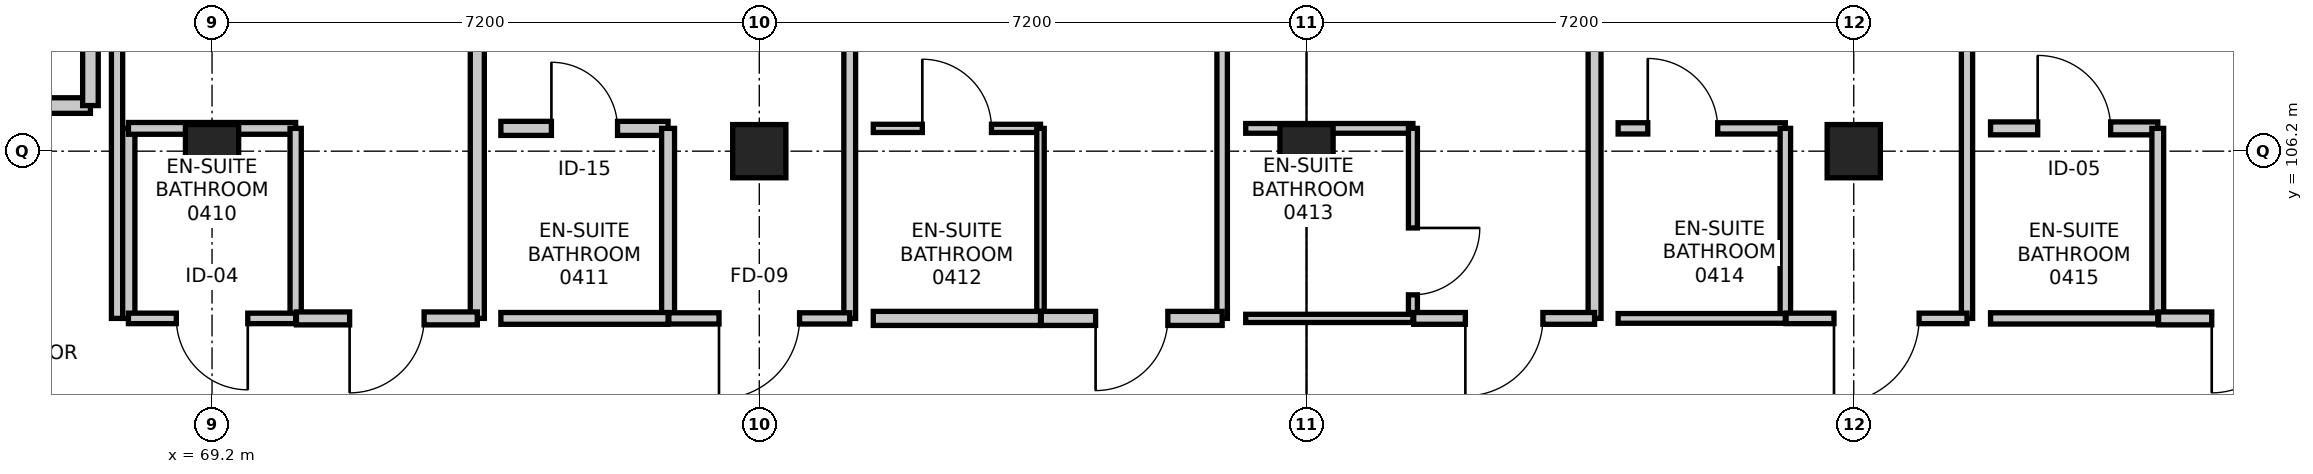
"""IFC4 building model, lengths in metres.
Left out: names, types, materials, properties, quantities, classifications, styles, units other than length and angle.
Written with IfcOpenShell. Run it as: python <this file> out.ifc"""

import sys

from ifc_helpers import new_model, si_unit, direction, frame, frame_2d, origin, origin_2d, place, context, subcontext, project, spatial, rectangle, extrude, element, fill, save


model = new_model("IFC4")
c1 = context("Model", 3, precision=1e-05, world=origin(), true_north=direction((0.0, 1.0)))
c2 = subcontext(c1, "Body", "Model", "MODEL_VIEW")
j1 = project(units=[si_unit("LENGTHUNIT", "METRE"), si_unit("PLANEANGLEUNIT", "RADIAN")], contexts=[c1])
p1 = place(None, origin())
s1 = spatial("IfcSite", under=j1, at=p1, CompositionType="ELEMENT")
p2 = place(p1, origin())
s2 = spatial("IfcBuilding", under=s1, at=p2, CompositionType="ELEMENT")
p3 = place(p2, frame((0.0, 0.0, 19.2)))
s3 = spatial("IfcBuildingStorey", under=s2, at=p3, CompositionType="ELEMENT", Elevation=19.2)
for number, where, z_axis, x_axis in (
    (1, (69.2, 106.2, 0.0), (0.0, 0.0, 1.0), (1.0, 0.0, 0.0)),
    (2, (76.4, 106.2, 0.0), (0.0, 0.0, 1.0), (1.0, 0.0, 0.0)),
    (3, (83.6, 106.2, 0.0), (0.0, 0.0, 1.0), (1.0, 0.0, 0.0)),
    (4, (90.8, 106.2, 0.0), (0.0, 0.0, 1.0), (1.0, 0.0, 0.0)),
):
    element("IfcColumn", number, at=place(p3, frame(where, z_axis=z_axis, x_axis=x_axis)), inside=s3, PredefinedType="COLUMN", context=c2, shape_type="SweptSolid", body=[
        extrude(rectangle(XDim=0.7, YDim=0.7, at=origin_2d()), origin(), (0.0, 0.0, 1.0), 3.6),
    ])
p4 = place(p3, frame((62.6, 106.8, 0.0), z_axis=(0.0, 0.0, 1.0), x_axis=(1.0, 0.0, 0.0)))
e5 = element("IfcWall", 5, at=p4, inside=s3, PredefinedType="PARTITIONING", context=c2, shape_type="SweptSolid", body=[
    extrude(rectangle(XDim=5.0, YDim=0.205, at=frame_2d((2.5, 0.0))), origin(), (0.0, 0.0, 1.0), 3.35),
])
p5 = place(p4, frame((1.9, 0.0, 0.0)))
e6 = element("IfcOpeningElement", 6, at=p5, cuts=e5, PredefinedType="OPENING", context=c2, shape_type="SweptSolid", body=[
    extrude(rectangle(XDim=1.2, YDim=2.1, at=frame_2d((0.6, 1.05))), frame((0.0, 0.113, 0.0), z_axis=(0.0, -1.0, 0.0), x_axis=(1.0, 0.0, 0.0)), (0.0, 0.0, 1.0), 0.225),
])
p6 = place(p3, frame((67.6, 106.8, 0.0), z_axis=(0.0, 0.0, 1.0), x_axis=(0.0, 1.0, 0.0)))
e7 = element("IfcWall", 7, at=p6, inside=s3, PredefinedType="PARTITIONING", context=c2, shape_type="SweptSolid", body=[
    extrude(rectangle(XDim=2.7, YDim=0.205, at=frame_2d((1.35, 0.0))), origin(), (0.0, 0.0, 1.0), 3.35),
])
p7 = place(p3, frame((68.1, 104.0, 0.0), z_axis=(0.0, 0.0, 1.0), x_axis=(0.0, 1.0, 0.0)))
e8 = element("IfcWall", 8, at=p7, inside=s3, PredefinedType="PARTITIONING", context=c2, shape_type="SweptSolid", body=[
    extrude(rectangle(XDim=2.5, YDim=0.17, at=frame_2d((1.25, 0.0))), origin(), (0.0, 0.0, 1.0), 2.735),
])
p8 = place(p3, frame((68.1, 106.5, 0.0), z_axis=(0.0, 0.0, 1.0), x_axis=(1.0, 0.0, 0.0)))
e9 = element("IfcWall", 9, at=p8, inside=s3, PredefinedType="PARTITIONING", context=c2, shape_type="SweptSolid", body=[
    extrude(rectangle(XDim=2.2, YDim=0.155, at=frame_2d((1.1, 0.0))), origin(), (0.0, 0.0, 1.0), 2.685),
])
p9 = place(p3, frame((70.3, 106.5, 0.0), z_axis=(0.0, 0.0, 1.0), x_axis=(0.0, -1.0, 0.0)))
e10 = element("IfcWall", 10, at=p9, inside=s3, PredefinedType="PARTITIONING", context=c2, shape_type="SweptSolid", body=[
    extrude(rectangle(XDim=2.5, YDim=0.148, at=frame_2d((1.25, 0.0))), origin(), (0.0, 0.0, 1.0), 2.735),
])
p10 = place(p3, frame((70.3, 104.0, 0.0), z_axis=(0.0, 0.0, 1.0), x_axis=(-1.0, 0.0, 0.0)))
e11 = element("IfcWall", 11, at=p10, inside=s3, PredefinedType="PARTITIONING", context=c2, shape_type="SweptSolid", body=[
    extrude(rectangle(XDim=2.2, YDim=0.138, at=frame_2d((1.1, 0.0))), origin(), (0.0, 0.0, 1.0), 2.685),
])
p11 = place(p10, frame((0.63, 0.0, 0.0)))
e12 = element("IfcOpeningElement", 12, at=p11, cuts=e11, PredefinedType="OPENING", context=c2, shape_type="SweptSolid", body=[
    extrude(rectangle(XDim=0.94, YDim=2.12, at=frame_2d((0.47, 1.06))), frame((0.0, 0.079, 0.0), z_axis=(0.0, -1.0, 0.0), x_axis=(1.0, 0.0, 0.0)), (0.0, 0.0, 1.0), 0.158),
])
p12 = place(p3, frame((67.95, 104.0, 0.0), z_axis=(0.0, 0.0, 1.0), x_axis=(0.0, 1.0, 0.0)))
e13 = element("IfcWall", 13, at=p12, inside=s3, PredefinedType="PARTITIONING", context=c2, shape_type="SweptSolid", body=[
    extrude(rectangle(XDim=11.042, YDim=0.148, at=frame_2d((5.521, 0.0))), origin(), (0.0, 0.0, 1.0), 2.735),
])
p13 = place(p3, frame((72.69, 115.339, 0.0), z_axis=(0.0, 0.0, 1.0), x_axis=(0.0, -1.0, 0.0)))
e14 = element("IfcWall", 14, at=p13, inside=s3, PredefinedType="PARTITIONING", context=c2, shape_type="SweptSolid", body=[
    extrude(rectangle(XDim=11.339, YDim=0.185, at=frame_2d((5.669, 0.0))), origin(), (0.0, 0.0, 1.0), 2.735),
])
p14 = place(p3, frame((72.69, 104.0, 0.0), z_axis=(0.0, 0.0, 1.0), x_axis=(-1.0, 0.0, 0.0)))
e15 = element("IfcWall", 15, at=p14, inside=s3, PredefinedType="PARTITIONING", context=c2, shape_type="SweptSolid", body=[
    extrude(rectangle(XDim=2.38, YDim=0.17, at=frame_2d((1.19, 0.0))), origin(), (0.0, 0.0, 1.0), 3.35),
])
p15 = place(p14, frame((0.7, 0.0, 0.0)))
e16 = element("IfcOpeningElement", 16, at=p15, cuts=e15, PredefinedType="OPENING", context=c2, shape_type="SweptSolid", body=[
    extrude(rectangle(XDim=0.98, YDim=2.15, at=frame_2d((0.49, 1.075))), frame((0.0, 0.095, 0.0), z_axis=(0.0, -1.0, 0.0), x_axis=(1.0, 0.0, 0.0)), (0.0, 0.0, 1.0), 0.19),
])
p16 = place(p3, frame((73.0, 106.5, 0.0), z_axis=(0.0, 0.0, 1.0), x_axis=(1.0, 0.0, 0.0)))
e17 = element("IfcWall", 17, at=p16, inside=s3, PredefinedType="PARTITIONING", context=c2, shape_type="SweptSolid", body=[
    extrude(rectangle(XDim=2.2, YDim=0.185, at=frame_2d((1.1, 0.0))), origin(), (0.0, 0.0, 1.0), 2.735),
])
p17 = place(p16, frame((0.665, 0.0, 0.0)))
e18 = element("IfcOpeningElement", 18, at=p17, cuts=e17, PredefinedType="OPENING", context=c2, shape_type="SweptSolid", body=[
    extrude(rectangle(XDim=0.87, YDim=2.07, at=frame_2d((0.435, 1.035))), frame((0.0, 0.103, 0.0), z_axis=(0.0, -1.0, 0.0), x_axis=(1.0, 0.0, 0.0)), (0.0, 0.0, 1.0), 0.205),
])
p18 = place(p3, frame((75.2, 106.5, 0.0), z_axis=(0.0, 0.0, 1.0), x_axis=(0.0, -1.0, 0.0)))
e19 = element("IfcWall", 19, at=p18, inside=s3, PredefinedType="PARTITIONING", context=c2, shape_type="SweptSolid", body=[
    extrude(rectangle(XDim=2.5, YDim=0.17, at=frame_2d((1.25, 0.0))), origin(), (0.0, 0.0, 1.0), 2.735),
])
p19 = place(p3, frame((75.2, 104.0, 0.0), z_axis=(0.0, 0.0, 1.0), x_axis=(-1.0, 0.0, 0.0)))
e20 = element("IfcWall", 20, at=p19, inside=s3, PredefinedType="PARTITIONING", context=c2, shape_type="SweptSolid", body=[
    extrude(rectangle(XDim=2.2, YDim=0.155, at=frame_2d((1.1, 0.0))), origin(), (0.0, 0.0, 1.0), 3.35),
])
p20 = place(p3, frame((77.59, 115.607, 0.0), z_axis=(0.0, 0.0, 1.0), x_axis=(0.0, -1.0, 0.0)))
e21 = element("IfcWall", 21, at=p20, inside=s3, PredefinedType="PARTITIONING", context=c2, shape_type="SweptSolid", body=[
    extrude(rectangle(XDim=11.607, YDim=0.155, at=frame_2d((5.804, 0.0))), origin(), (0.0, 0.0, 1.0), 2.735),
])
p21 = place(p3, frame((77.59, 104.0, 0.0), z_axis=(0.0, 0.0, 1.0), x_axis=(-1.0, 0.0, 0.0)))
e22 = element("IfcWall", 22, at=p21, inside=s3, PredefinedType="PARTITIONING", context=c2, shape_type="SweptSolid", body=[
    extrude(rectangle(XDim=2.38, YDim=0.148, at=frame_2d((1.19, 0.0))), origin(), (0.0, 0.0, 1.0), 2.685),
])
p22 = place(p21, frame((0.66, 0.0, 0.0)))
e23 = element("IfcOpeningElement", 23, at=p22, cuts=e22, PredefinedType="OPENING", context=c2, shape_type="SweptSolid", body=[
    extrude(rectangle(XDim=1.06, YDim=2.2, at=frame_2d((0.53, 1.1))), frame((0.0, 0.084, 0.0), z_axis=(0.0, -1.0, 0.0), x_axis=(1.0, 0.0, 0.0)), (0.0, 0.0, 1.0), 0.168),
])
p23 = place(p3, frame((77.9, 106.5, 0.0), z_axis=(0.0, 0.0, 1.0), x_axis=(1.0, 0.0, 0.0)))
e24 = element("IfcWall", 24, at=p23, inside=s3, PredefinedType="PARTITIONING", context=c2, shape_type="SweptSolid", body=[
    extrude(rectangle(XDim=2.2, YDim=0.108, at=frame_2d((1.1, 0.0))), origin(), (0.0, 0.0, 1.0), 3.35),
])
p24 = place(p23, frame((0.645, 0.0, 0.0)))
e25 = element("IfcOpeningElement", 25, at=p24, cuts=e24, PredefinedType="OPENING", context=c2, shape_type="SweptSolid", body=[
    extrude(rectangle(XDim=0.91, YDim=2.11, at=frame_2d((0.455, 1.055))), frame((0.0, 0.064, 0.0), z_axis=(0.0, -1.0, 0.0), x_axis=(1.0, 0.0, 0.0)), (0.0, 0.0, 1.0), 0.128),
])
p25 = place(p3, frame((80.1, 106.5, 0.0), z_axis=(0.0, 0.0, 1.0), x_axis=(0.0, -1.0, 0.0)))
e26 = element("IfcWall", 26, at=p25, inside=s3, PredefinedType="PARTITIONING", context=c2, shape_type="SweptSolid", body=[
    extrude(rectangle(XDim=2.5, YDim=0.098, at=frame_2d((1.25, 0.0))), origin(), (0.0, 0.0, 1.0), 2.735),
])
p26 = place(p3, frame((80.1, 104.0, 0.0), z_axis=(0.0, 0.0, 1.0), x_axis=(-1.0, 0.0, 0.0)))
e27 = element("IfcWall", 27, at=p26, inside=s3, PredefinedType="PARTITIONING", context=c2, shape_type="SweptSolid", body=[
    extrude(rectangle(XDim=2.2, YDim=0.185, at=frame_2d((1.1, 0.0))), origin(), (0.0, 0.0, 1.0), 3.35),
])
p27 = place(p3, frame((82.49, 115.829, 0.0), z_axis=(0.0, 0.0, 1.0), x_axis=(0.0, -1.0, 0.0)))
e28 = element("IfcWall", 28, at=p27, inside=s3, PredefinedType="PARTITIONING", context=c2, shape_type="SweptSolid", body=[
    extrude(rectangle(XDim=11.829, YDim=0.138, at=frame_2d((5.915, 0.0))), origin(), (0.0, 0.0, 1.0), 2.735),
])
p28 = place(p3, frame((82.49, 104.0, 0.0), z_axis=(0.0, 0.0, 1.0), x_axis=(-1.0, 0.0, 0.0)))
e29 = element("IfcWall", 29, at=p28, inside=s3, PredefinedType="PARTITIONING", context=c2, shape_type="SweptSolid", body=[
    extrude(rectangle(XDim=2.38, YDim=0.185, at=frame_2d((1.19, 0.0))), origin(), (0.0, 0.0, 1.0), 3.35),
])
p29 = place(p28, frame((0.715, 0.0, 0.0)))
e30 = element("IfcOpeningElement", 30, at=p29, cuts=e29, PredefinedType="OPENING", context=c2, shape_type="SweptSolid", body=[
    extrude(rectangle(XDim=0.95, YDim=2.1, at=frame_2d((0.475, 1.05))), frame((0.0, 0.103, 0.0), z_axis=(0.0, -1.0, 0.0), x_axis=(1.0, 0.0, 0.0)), (0.0, 0.0, 1.0), 0.205),
])
p30 = place(p3, frame((82.8, 106.5, 0.0), z_axis=(0.0, 0.0, 1.0), x_axis=(1.0, 0.0, 0.0)))
e31 = element("IfcWall", 31, at=p30, inside=s3, PredefinedType="PARTITIONING", context=c2, shape_type="SweptSolid", body=[
    extrude(rectangle(XDim=2.2, YDim=0.128, at=frame_2d((1.1, 0.0))), origin(), (0.0, 0.0, 1.0), 2.685),
])
p31 = place(p3, frame((85.0, 106.5, 0.0), z_axis=(0.0, 0.0, 1.0), x_axis=(0.0, -1.0, 0.0)))
e32 = element("IfcWall", 32, at=p31, inside=s3, PredefinedType="PARTITIONING", context=c2, shape_type="SweptSolid", body=[
    extrude(rectangle(XDim=2.5, YDim=0.118, at=frame_2d((1.25, 0.0))), origin(), (0.0, 0.0, 1.0), 2.735),
])
p32 = place(p31, frame((1.31, 0.0, 0.0)))
e33 = element("IfcOpeningElement", 33, at=p32, cuts=e32, PredefinedType="OPENING", context=c2, shape_type="SweptSolid", body=[
    extrude(rectangle(XDim=0.88, YDim=2.06, at=frame_2d((0.44, 1.03))), frame((0.0, 0.069, 0.0), z_axis=(0.0, -1.0, 0.0), x_axis=(1.0, 0.0, 0.0)), (0.0, 0.0, 1.0), 0.138),
])
p33 = place(p3, frame((85.0, 104.0, 0.0), z_axis=(0.0, 0.0, 1.0), x_axis=(-1.0, 0.0, 0.0)))
e34 = element("IfcWall", 34, at=p33, inside=s3, PredefinedType="PARTITIONING", context=c2, shape_type="SweptSolid", body=[
    extrude(rectangle(XDim=2.2, YDim=0.108, at=frame_2d((1.1, 0.0))), origin(), (0.0, 0.0, 1.0), 2.685),
])
p34 = place(p3, frame((87.39, 115.997, 0.0), z_axis=(0.0, 0.0, 1.0), x_axis=(0.0, -1.0, 0.0)))
e35 = element("IfcWall", 35, at=p34, inside=s3, PredefinedType="PARTITIONING", context=c2, shape_type="SweptSolid", body=[
    extrude(rectangle(XDim=11.997, YDim=0.17, at=frame_2d((5.999, 0.0))), origin(), (0.0, 0.0, 1.0), 2.735),
])
p35 = place(p3, frame((87.39, 104.0, 0.0), z_axis=(0.0, 0.0, 1.0), x_axis=(-1.0, 0.0, 0.0)))
e36 = element("IfcWall", 36, at=p35, inside=s3, PredefinedType="PARTITIONING", context=c2, shape_type="SweptSolid", body=[
    extrude(rectangle(XDim=2.38, YDim=0.155, at=frame_2d((1.19, 0.0))), origin(), (0.0, 0.0, 1.0), 3.35),
])
p36 = place(p35, frame((0.68, 0.0, 0.0)))
e37 = element("IfcOpeningElement", 37, at=p36, cuts=e36, PredefinedType="OPENING", context=c2, shape_type="SweptSolid", body=[
    extrude(rectangle(XDim=1.02, YDim=2.15, at=frame_2d((0.51, 1.075))), frame((0.0, 0.087, 0.0), z_axis=(0.0, -1.0, 0.0), x_axis=(1.0, 0.0, 0.0)), (0.0, 0.0, 1.0), 0.175),
])
p37 = place(p3, frame((87.7, 106.5, 0.0), z_axis=(0.0, 0.0, 1.0), x_axis=(1.0, 0.0, 0.0)))
e38 = element("IfcWall", 38, at=p37, inside=s3, PredefinedType="PARTITIONING", context=c2, shape_type="SweptSolid", body=[
    extrude(rectangle(XDim=2.2, YDim=0.148, at=frame_2d((1.1, 0.0))), origin(), (0.0, 0.0, 1.0), 3.35),
])
p38 = place(p37, frame((0.39, 0.0, 0.0)))
e39 = element("IfcOpeningElement", 39, at=p38, cuts=e38, PredefinedType="OPENING", context=c2, shape_type="SweptSolid", body=[
    extrude(rectangle(XDim=0.92, YDim=2.1, at=frame_2d((0.46, 1.05))), frame((0.0, 0.084, 0.0), z_axis=(0.0, -1.0, 0.0), x_axis=(1.0, 0.0, 0.0)), (0.0, 0.0, 1.0), 0.168),
])
p39 = place(p3, frame((89.9, 106.5, 0.0), z_axis=(0.0, 0.0, 1.0), x_axis=(0.0, -1.0, 0.0)))
e40 = element("IfcWall", 40, at=p39, inside=s3, PredefinedType="PARTITIONING", context=c2, shape_type="SweptSolid", body=[
    extrude(rectangle(XDim=2.5, YDim=0.138, at=frame_2d((1.25, 0.0))), origin(), (0.0, 0.0, 1.0), 2.735),
])
p40 = place(p3, frame((89.9, 104.0, 0.0), z_axis=(0.0, 0.0, 1.0), x_axis=(-1.0, 0.0, 0.0)))
e41 = element("IfcWall", 41, at=p40, inside=s3, PredefinedType="PARTITIONING", context=c2, shape_type="SweptSolid", body=[
    extrude(rectangle(XDim=2.2, YDim=0.128, at=frame_2d((1.1, 0.0))), origin(), (0.0, 0.0, 1.0), 3.35),
])
p41 = place(p3, frame((92.29, 116.104, 0.0), z_axis=(0.0, 0.0, 1.0), x_axis=(0.0, -1.0, 0.0)))
e42 = element("IfcWall", 42, at=p41, inside=s3, PredefinedType="PARTITIONING", context=c2, shape_type="SweptSolid", body=[
    extrude(rectangle(XDim=12.104, YDim=0.148, at=frame_2d((6.052, 0.0))), origin(), (0.0, 0.0, 1.0), 2.735),
])
p42 = place(p3, frame((92.29, 104.0, 0.0), z_axis=(0.0, 0.0, 1.0), x_axis=(-1.0, 0.0, 0.0)))
e43 = element("IfcWall", 43, at=p42, inside=s3, PredefinedType="PARTITIONING", context=c2, shape_type="SweptSolid", body=[
    extrude(rectangle(XDim=2.38, YDim=0.138, at=frame_2d((1.19, 0.0))), origin(), (0.0, 0.0, 1.0), 2.685),
])
p43 = place(p42, frame((0.63, 0.0, 0.0)))
e44 = element("IfcOpeningElement", 44, at=p43, cuts=e43, PredefinedType="OPENING", context=c2, shape_type="SweptSolid", body=[
    extrude(rectangle(XDim=1.12, YDim=2.2, at=frame_2d((0.56, 1.1))), frame((0.0, 0.079, 0.0), z_axis=(0.0, -1.0, 0.0), x_axis=(1.0, 0.0, 0.0)), (0.0, 0.0, 1.0), 0.158),
])
p44 = place(p3, frame((92.6, 106.5, 0.0), z_axis=(0.0, 0.0, 1.0), x_axis=(1.0, 0.0, 0.0)))
e45 = element("IfcWall", 45, at=p44, inside=s3, PredefinedType="PARTITIONING", context=c2, shape_type="SweptSolid", body=[
    extrude(rectangle(XDim=2.2, YDim=0.17, at=frame_2d((1.1, 0.0))), origin(), (0.0, 0.0, 1.0), 2.735),
])
p45 = place(p44, frame((0.62, 0.0, 0.0)))
e46 = element("IfcOpeningElement", 46, at=p45, cuts=e45, PredefinedType="OPENING", context=c2, shape_type="SweptSolid", body=[
    extrude(rectangle(XDim=0.96, YDim=2.14, at=frame_2d((0.48, 1.07))), frame((0.0, 0.095, 0.0), z_axis=(0.0, -1.0, 0.0), x_axis=(1.0, 0.0, 0.0)), (0.0, 0.0, 1.0), 0.19),
])
p46 = place(p3, frame((94.8, 106.5, 0.0), z_axis=(0.0, 0.0, 1.0), x_axis=(0.0, -1.0, 0.0)))
e47 = element("IfcWall", 47, at=p46, inside=s3, PredefinedType="PARTITIONING", context=c2, shape_type="SweptSolid", body=[
    extrude(rectangle(XDim=2.5, YDim=0.155, at=frame_2d((1.25, 0.0))), origin(), (0.0, 0.0, 1.0), 2.735),
])
p47 = place(p3, frame((94.8, 104.0, 0.0), z_axis=(0.0, 0.0, 1.0), x_axis=(-1.0, 0.0, 0.0)))
e48 = element("IfcWall", 48, at=p47, inside=s3, PredefinedType="PARTITIONING", context=c2, shape_type="SweptSolid", body=[
    extrude(rectangle(XDim=2.2, YDim=0.148, at=frame_2d((1.1, 0.0))), origin(), (0.0, 0.0, 1.0), 3.35),
])
p48 = place(p3, frame((97.19, 104.0, 0.0), z_axis=(0.0, 0.0, 1.0), x_axis=(-1.0, 0.0, 0.0)))
e49 = element("IfcWall", 49, at=p48, inside=s3, PredefinedType="PARTITIONING", context=c2, shape_type="SweptSolid", body=[
    extrude(rectangle(XDim=2.38, YDim=0.17, at=frame_2d((1.19, 0.0))), origin(), (0.0, 0.0, 1.0), 3.35),
])
p49 = place(p48, frame((0.7, 0.0, 0.0)))
e50 = element("IfcOpeningElement", 50, at=p49, cuts=e49, PredefinedType="OPENING", context=c2, shape_type="SweptSolid", body=[
    extrude(rectangle(XDim=0.98, YDim=2.15, at=frame_2d((0.49, 1.075))), frame((0.0, 0.095, 0.0), z_axis=(0.0, -1.0, 0.0), x_axis=(1.0, 0.0, 0.0)), (0.0, 0.0, 1.0), 0.19),
])
p50 = place(p11, origin())
e51 = element("IfcDoor", 51, at=p50, inside=s3, OperationType="SINGLE_SWING_LEFT", PredefinedType="DOOR", context=c2, shape_type="SweptSolid", body=[
    extrude(rectangle(XDim=0.94, YDim=2.12, at=frame_2d((0.47, 1.06))), frame((0.0, 0.025, 0.0), z_axis=(0.0, -1.0, 0.0), x_axis=(1.0, 0.0, 0.0)), (0.0, 0.0, 1.0), 0.05),
])
fill(e12, e51)
p51 = place(p15, origin())
e52 = element("IfcDoor", 52, at=p51, inside=s3, OperationType="SINGLE_SWING_RIGHT", PredefinedType="DOOR", context=c2, shape_type="SweptSolid", body=[
    extrude(rectangle(XDim=0.98, YDim=2.15, at=frame_2d((0.49, 1.075))), frame((0.0, 0.025, 0.0), z_axis=(0.0, -1.0, 0.0), x_axis=(1.0, 0.0, 0.0)), (0.0, 0.0, 1.0), 0.05),
])
fill(e16, e52)
p52 = place(p17, origin())
e53 = element("IfcDoor", 53, at=p52, inside=s3, OperationType="SINGLE_SWING_LEFT", PredefinedType="DOOR", context=c2, shape_type="SweptSolid", body=[
    extrude(rectangle(XDim=0.87, YDim=2.07, at=frame_2d((0.435, 1.035))), frame((0.0, 0.025, 0.0), z_axis=(0.0, -1.0, 0.0), x_axis=(1.0, 0.0, 0.0)), (0.0, 0.0, 1.0), 0.05),
])
fill(e18, e53)
p53 = place(p22, origin())
e54 = element("IfcDoor", 54, at=p53, inside=s3, OperationType="SINGLE_SWING_RIGHT", PredefinedType="DOOR", context=c2, shape_type="SweptSolid", body=[
    extrude(rectangle(XDim=1.06, YDim=2.2, at=frame_2d((0.53, 1.1))), frame((0.0, 0.025, 0.0), z_axis=(0.0, -1.0, 0.0), x_axis=(1.0, 0.0, 0.0)), (0.0, 0.0, 1.0), 0.05),
])
fill(e23, e54)
p54 = place(p24, origin())
e55 = element("IfcDoor", 55, at=p54, inside=s3, OperationType="SINGLE_SWING_LEFT", PredefinedType="DOOR", context=c2, shape_type="SweptSolid", body=[
    extrude(rectangle(XDim=0.91, YDim=2.11, at=frame_2d((0.455, 1.055))), frame((0.0, 0.025, 0.0), z_axis=(0.0, -1.0, 0.0), x_axis=(1.0, 0.0, 0.0)), (0.0, 0.0, 1.0), 0.05),
])
fill(e25, e55)
p55 = place(p29, origin())
e56 = element("IfcDoor", 56, at=p55, inside=s3, OperationType="SINGLE_SWING_RIGHT", PredefinedType="DOOR", context=c2, shape_type="SweptSolid", body=[
    extrude(rectangle(XDim=0.95, YDim=2.1, at=frame_2d((0.475, 1.05))), frame((0.0, 0.025, 0.0), z_axis=(0.0, -1.0, 0.0), x_axis=(1.0, 0.0, 0.0)), (0.0, 0.0, 1.0), 0.05),
])
fill(e30, e56)
p56 = place(p32, origin())
e57 = element("IfcDoor", 57, at=p56, inside=s3, OperationType="SINGLE_SWING_LEFT", PredefinedType="DOOR", context=c2, shape_type="SweptSolid", body=[
    extrude(rectangle(XDim=0.88, YDim=2.06, at=frame_2d((0.44, 1.03))), frame((0.0, 0.025, 0.0), z_axis=(0.0, -1.0, 0.0), x_axis=(1.0, 0.0, 0.0)), (0.0, 0.0, 1.0), 0.05),
])
fill(e33, e57)
p57 = place(p36, origin())
e58 = element("IfcDoor", 58, at=p57, inside=s3, OperationType="SINGLE_SWING_RIGHT", PredefinedType="DOOR", context=c2, shape_type="SweptSolid", body=[
    extrude(rectangle(XDim=1.02, YDim=2.15, at=frame_2d((0.51, 1.075))), frame((0.0, 0.025, 0.0), z_axis=(0.0, -1.0, 0.0), x_axis=(1.0, 0.0, 0.0)), (0.0, 0.0, 1.0), 0.05),
])
fill(e37, e58)
p58 = place(p38, origin())
e59 = element("IfcDoor", 59, at=p58, inside=s3, OperationType="SINGLE_SWING_LEFT", PredefinedType="DOOR", context=c2, shape_type="SweptSolid", body=[
    extrude(rectangle(XDim=0.92, YDim=2.1, at=frame_2d((0.46, 1.05))), frame((0.0, 0.025, 0.0), z_axis=(0.0, -1.0, 0.0), x_axis=(1.0, 0.0, 0.0)), (0.0, 0.0, 1.0), 0.05),
])
fill(e39, e59)
p59 = place(p43, origin())
e60 = element("IfcDoor", 60, at=p59, inside=s3, OperationType="SINGLE_SWING_RIGHT", PredefinedType="DOOR", context=c2, shape_type="SweptSolid", body=[
    extrude(rectangle(XDim=1.12, YDim=2.2, at=frame_2d((0.56, 1.1))), frame((0.0, 0.025, 0.0), z_axis=(0.0, -1.0, 0.0), x_axis=(1.0, 0.0, 0.0)), (0.0, 0.0, 1.0), 0.05),
])
fill(e44, e60)
p60 = place(p45, origin())
e61 = element("IfcDoor", 61, at=p60, inside=s3, OperationType="SINGLE_SWING_LEFT", PredefinedType="DOOR", context=c2, shape_type="SweptSolid", body=[
    extrude(rectangle(XDim=0.96, YDim=2.14, at=frame_2d((0.48, 1.07))), frame((0.0, 0.025, 0.0), z_axis=(0.0, -1.0, 0.0), x_axis=(1.0, 0.0, 0.0)), (0.0, 0.0, 1.0), 0.05),
])
fill(e46, e61)
p61 = place(p49, origin())
e62 = element("IfcDoor", 62, at=p61, inside=s3, OperationType="SINGLE_SWING_RIGHT", PredefinedType="DOOR", context=c2, shape_type="SweptSolid", body=[
    extrude(rectangle(XDim=0.98, YDim=2.15, at=frame_2d((0.49, 1.075))), frame((0.0, 0.025, 0.0), z_axis=(0.0, -1.0, 0.0), x_axis=(1.0, 0.0, 0.0)), (0.0, 0.0, 1.0), 0.05),
])
fill(e50, e62)
save(model, sys.argv[1])
